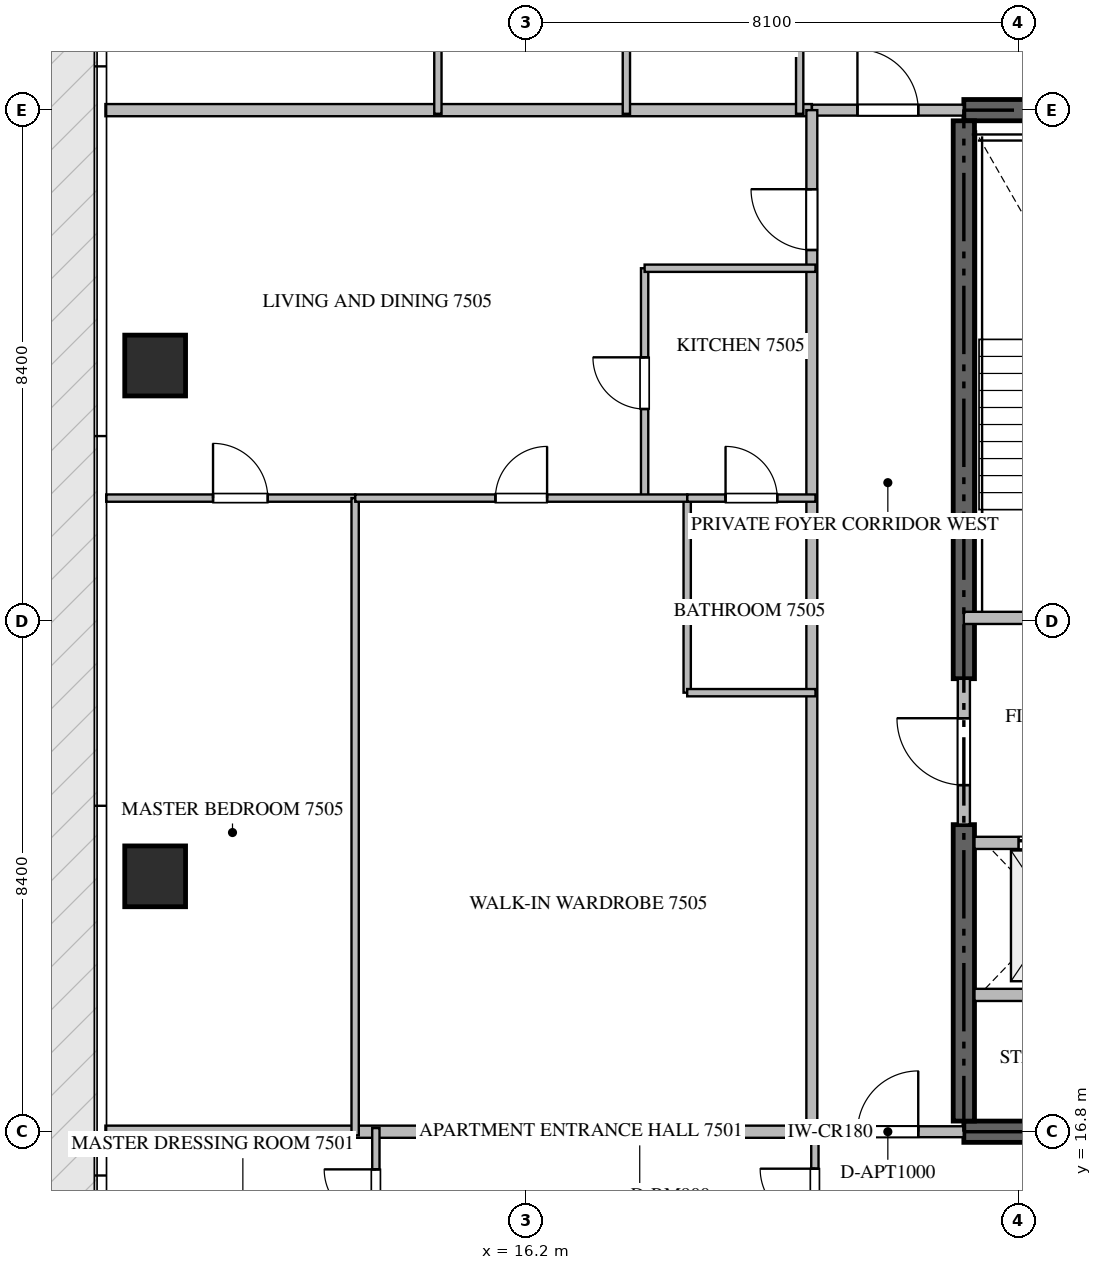
"""IFC4 building model, lengths in metres.
Left out: names, types, materials, properties, quantities, classifications, styles, units other than length and angle.
Written with IfcOpenShell. Run it as: python <this file> out.ifc"""

import sys

from ifc_helpers import new_model, si_unit, direction, frame, frame_2d, origin, origin_2d, place, context, subcontext, project, spatial, rectangle, extrude, source, transform, mapped, element, fill, save


model = new_model("IFC4")
c1 = context("Model", 3, precision=1e-05, world=origin(), true_north=direction((0.0, 1.0)))
c2 = subcontext(c1, "Body", "Model", "MODEL_VIEW")
j1 = project(units=[si_unit("LENGTHUNIT", "METRE"), si_unit("PLANEANGLEUNIT", "RADIAN")], contexts=[c1])
p1 = place(None, origin())
s1 = spatial("IfcSite", under=j1, at=p1, CompositionType="ELEMENT")
p2 = place(p1, origin())
s2 = spatial("IfcBuilding", under=s1, at=p2, CompositionType="ELEMENT")
p3 = place(p2, frame((0.0, 0.0, 301.55)))
s3 = spatial("IfcBuildingStorey", under=s2, at=p3, CompositionType="ELEMENT", Elevation=301.55)
for number, where, z_axis, x_axis in (
    (1, (23.4, 16.8, -0.26), (0.0, 0.0, 1.0), (1.0, 0.0, 0.0)),
    (2, (41.4, 33.6, -0.26), (0.0, 0.0, 1.0), (-1.0, 0.0, 0.0)),
):
    element("IfcWall", number, at=place(p3, frame(where, z_axis=z_axis, x_axis=x_axis)), inside=s3, PredefinedType="SHEAR", context=c2, shape_type="SweptSolid", body=[
        extrude(rectangle(XDim=18.0, YDim=0.35, at=frame_2d((9.0, 0.0))), origin(), (0.0, 0.0, 1.0), 4.048),
    ])
p4 = place(p3, frame((23.4, 16.975, -0.26), z_axis=(0.0, 0.0, 1.0), x_axis=(0.0, 1.0, 0.0)))
e3 = element("IfcWall", 3, at=p4, inside=s3, PredefinedType="SHEAR", context=c2, shape_type="SweptSolid", body=[
    extrude(rectangle(XDim=4.875, YDim=0.35, at=frame_2d((2.438, 0.0))), origin(), (0.0, 0.0, 1.0), 4.048),
])
p5 = place(p3, frame((23.4, 24.25, -0.26), z_axis=(0.0, 0.0, 1.0), x_axis=(0.0, 1.0, 0.0)))
e4 = element("IfcWall", 4, at=p5, inside=s3, PredefinedType="SHEAR", context=c2, shape_type="SweptSolid", body=[
    extrude(rectangle(XDim=9.175, YDim=0.35, at=frame_2d((4.587, 0.0))), origin(), (0.0, 0.0, 1.0), 4.048),
])
m1 = source(origin(), c2, "Body", "SweptSolid", [
    extrude(rectangle(XDim=1.0, YDim=1.0, at=origin_2d()), origin(), (0.0, 0.0, 1.0), 4.05),
])
for number, where, z_axis, x_axis in (
    (5, (10.1, 21.0, -0.26), (0.0, 0.0, 1.0), (1.0, 0.0, 0.0)),
    (6, (10.1, 29.4, -0.26), (0.0, 0.0, 1.0), (1.0, 0.0, 0.0)),
):
    element("IfcColumn", number, at=place(p3, frame(where, z_axis=z_axis, x_axis=x_axis)), inside=s3, PredefinedType="COLUMN", context=c2, shape_type="MappedRepresentation", body=[
        mapped(m1, transform((0.0, 0.0, 0.0), scale=1.0)),
    ])
p6 = place(p3, frame((23.4, 25.25, 0.0), z_axis=(0.0, 0.0, 1.0), x_axis=(1.0, 0.0, 0.0)))
e7 = element("IfcWall", 7, at=p6, inside=s3, PredefinedType="STANDARD", context=c2, shape_type="SweptSolid", body=[
    extrude(rectangle(XDim=4.45, YDim=0.2, at=frame_2d((2.225, 0.0))), origin(), (0.0, 0.0, 1.0), 3.79),
])
p7 = place(p6, frame((1.65, 0.0, 0.0)))
e8 = element("IfcOpeningElement", 8, at=p7, cuts=e7, PredefinedType="OPENING", context=c2, shape_type="SweptSolid", body=[
    extrude(rectangle(XDim=1.1, YDim=2.15, at=frame_2d((0.55, 1.075))), frame((0.0, 0.11, 0.0), z_axis=(0.0, -1.0, 0.0), x_axis=(1.0, 0.0, 0.0)), (0.0, 0.0, 1.0), 0.22),
])
p8 = place(p3, frame((23.575, 21.55, 0.0), z_axis=(0.0, 0.0, 1.0), x_axis=(1.0, 0.0, 0.0)))
e9 = element("IfcWall", 9, at=p8, inside=s3, PredefinedType="STANDARD", context=c2, shape_type="SweptSolid", body=[
    extrude(rectangle(XDim=2.475, YDim=0.2, at=frame_2d((1.238, 0.0))), origin(), (0.0, 0.0, 1.0), 3.79),
])
p9 = place(p8, frame((0.725, 0.0, 0.0)))
e10 = element("IfcOpeningElement", 10, at=p9, cuts=e9, PredefinedType="OPENING", context=c2, shape_type="SweptSolid", body=[
    extrude(rectangle(XDim=1.2, YDim=2.2, at=frame_2d((0.6, 1.1))), frame((0.0, 0.11, 0.0), z_axis=(0.0, -1.0, 0.0), x_axis=(1.0, 0.0, 0.0)), (0.0, 0.0, 1.0), 0.22),
])
p10 = place(p3, frame((23.575, 19.05, 0.0), z_axis=(0.0, 0.0, 1.0), x_axis=(1.0, 0.0, 0.0)))
e11 = element("IfcWall", 11, at=p10, inside=s3, PredefinedType="STANDARD", context=c2, shape_type="SweptSolid", body=[
    extrude(rectangle(XDim=2.475, YDim=0.2, at=frame_2d((1.238, 0.0))), origin(), (0.0, 0.0, 1.0), 3.79),
])
p11 = place(p3, frame((23.4, 21.852, 0.0), z_axis=(0.0, 0.0, 1.0), x_axis=(0.0, 1.0, 0.0)))
e12 = element("IfcWall", 12, at=p11, inside=s3, PredefinedType="STANDARD", context=c2, shape_type="SweptSolid", body=[
    extrude(rectangle(XDim=2.396, YDim=0.2, at=frame_2d((1.198, 0.0))), origin(), (0.0, 0.0, 1.0), 3.79),
])
p12 = place(p11, frame((0.648, 0.0, 0.0)))
e13 = element("IfcOpeningElement", 13, at=p12, cuts=e12, PredefinedType="OPENING", context=c2, shape_type="SweptSolid", body=[
    extrude(rectangle(XDim=1.1, YDim=2.15, at=frame_2d((0.55, 1.075))), frame((0.0, 0.11, 0.0), z_axis=(0.0, -1.0, 0.0), x_axis=(1.0, 0.0, 0.0)), (0.0, 0.0, 1.0), 0.22),
])
for number, where, z_axis, x_axis in (
    (14, (9.282, 16.8, 0.0), (0.0, 0.0, 1.0), (1.0, 0.0, 0.0)),
    (15, (9.282, 33.6, 0.0), (0.0, 0.0, 1.0), (1.0, 0.0, 0.0)),
):
    element("IfcWall", number, at=place(p3, frame(where, z_axis=z_axis, x_axis=x_axis)), inside=s3, PredefinedType="PARTITIONING", context=c2, shape_type="SweptSolid", body=[
        extrude(rectangle(XDim=11.618, YDim=0.2, at=frame_2d((5.809, 0.0))), origin(), (0.0, 0.0, 1.0), 3.79),
    ])
p13 = place(p3, frame((20.902, 16.8, 0.0), z_axis=(0.0, 0.0, 1.0), x_axis=(1.0, 0.0, 0.0)))
e16 = element("IfcWall", 16, at=p13, inside=s3, PredefinedType="PARTITIONING", context=c2, shape_type="SweptSolid", body=[
    extrude(rectangle(XDim=2.496, YDim=0.18, at=frame_2d((1.248, 0.0))), origin(), (0.0, 0.0, 1.0), 3.79),
])
p14 = place(p13, frame((0.748, 0.0, 0.0)))
e17 = element("IfcOpeningElement", 17, at=p14, cuts=e16, PredefinedType="OPENING", context=c2, shape_type="SweptSolid", body=[
    extrude(rectangle(XDim=1.0, YDim=2.15, at=frame_2d((0.5, 1.075))), frame((0.0, 0.1, 0.0), z_axis=(0.0, -1.0, 0.0), x_axis=(1.0, 0.0, 0.0)), (0.0, 0.0, 1.0), 0.2),
])
p15 = place(p3, frame((20.902, 33.6, 0.0), z_axis=(0.0, 0.0, 1.0), x_axis=(1.0, 0.0, 0.0)))
e18 = element("IfcWall", 18, at=p15, inside=s3, PredefinedType="PARTITIONING", context=c2, shape_type="SweptSolid", body=[
    extrude(rectangle(XDim=2.496, YDim=0.18, at=frame_2d((1.248, 0.0))), origin(), (0.0, 0.0, 1.0), 3.79),
])
p16 = place(p15, frame((0.748, 0.0, 0.0)))
e19 = element("IfcOpeningElement", 19, at=p16, cuts=e18, PredefinedType="OPENING", context=c2, shape_type="SweptSolid", body=[
    extrude(rectangle(XDim=1.0, YDim=2.15, at=frame_2d((0.5, 1.075))), frame((0.0, 0.1, 0.0), z_axis=(0.0, -1.0, 0.0), x_axis=(1.0, 0.0, 0.0)), (0.0, 0.0, 1.0), 0.2),
])
p17 = place(p3, frame((20.9, 16.8, 0.0), z_axis=(0.0, 0.0, 1.0), x_axis=(0.0, 1.0, 0.0)))
e20 = element("IfcWall", 20, at=p17, inside=s3, PredefinedType="PARTITIONING", context=c2, shape_type="SweptSolid", body=[
    extrude(rectangle(XDim=16.8, YDim=0.18, at=frame_2d((8.4, 0.0))), origin(), (0.0, 0.0, 1.0), 3.79),
])
p18 = place(p17, frame((14.5, 0.0, 0.0)))
e21 = element("IfcOpeningElement", 21, at=p18, cuts=e20, PredefinedType="OPENING", context=c2, shape_type="SweptSolid", body=[
    extrude(rectangle(XDim=1.0, YDim=2.15, at=frame_2d((0.5, 1.075))), frame((0.0, 0.1, 0.0), z_axis=(0.0, -1.0, 0.0), x_axis=(1.0, 0.0, 0.0)), (0.0, 0.0, 1.0), 0.2),
])
p19 = place(p3, frame((20.95, 14.65, 0.0), z_axis=(0.0, 0.0, 1.0), x_axis=(0.0, 1.0, 0.0)))
e22 = element("IfcWall", 22, at=p19, inside=s3, PredefinedType="PARTITIONING", context=c2, shape_type="SweptSolid", body=[
    extrude(rectangle(XDim=2.148, YDim=0.12, at=frame_2d((1.074, 0.0))), origin(), (0.0, 0.0, 1.0), 3.79),
])
p20 = place(p19, frame((0.642, 0.0, 0.0)))
e23 = element("IfcOpeningElement", 23, at=p20, cuts=e22, PredefinedType="OPENING", context=c2, shape_type="SweptSolid", body=[
    extrude(rectangle(XDim=0.9, YDim=2.1, at=frame_2d((0.45, 1.05))), frame((0.0, 0.07, 0.0), z_axis=(0.0, -1.0, 0.0), x_axis=(1.0, 0.0, 0.0)), (0.0, 0.0, 1.0), 0.14),
])
p21 = place(p3, frame((13.73, 14.652, 0.0), z_axis=(0.0, 0.0, 1.0), x_axis=(0.0, 1.0, 0.0)))
e24 = element("IfcWall", 24, at=p21, inside=s3, PredefinedType="PARTITIONING", context=c2, shape_type="SweptSolid", body=[
    extrude(rectangle(XDim=2.208, YDim=0.12, at=frame_2d((1.104, 0.0))), origin(), (0.0, 0.0, 1.0), 3.79),
])
p22 = place(p21, frame((0.679, 0.0, 0.0)))
e25 = element("IfcOpeningElement", 25, at=p22, cuts=e24, PredefinedType="OPENING", context=c2, shape_type="SweptSolid", body=[
    extrude(rectangle(XDim=0.85, YDim=2.1, at=frame_2d((0.425, 1.05))), frame((0.0, 0.07, 0.0), z_axis=(0.0, -1.0, 0.0), x_axis=(1.0, 0.0, 0.0)), (0.0, 0.0, 1.0), 0.14),
])
p23 = place(p3, frame((20.7, 36.35, 0.0), z_axis=(0.0, 0.0, 1.0), x_axis=(0.0, -1.0, 0.0)))
e26 = element("IfcWall", 26, at=p23, inside=s3, PredefinedType="PARTITIONING", context=c2, shape_type="SweptSolid", body=[
    extrude(rectangle(XDim=2.81, YDim=0.12, at=frame_2d((1.405, 0.0))), origin(), (0.0, 0.0, 1.0), 3.79),
])
p24 = place(p3, frame((14.75, 37.807, 0.0), z_axis=(0.0, 0.0, 1.0), x_axis=(0.0, -1.0, 0.0)))
e27 = element("IfcWall", 27, at=p24, inside=s3, PredefinedType="PARTITIONING", context=c2, shape_type="SweptSolid", body=[
    extrude(rectangle(XDim=4.267, YDim=0.12, at=frame_2d((2.133, 0.0))), origin(), (0.0, 0.0, 1.0), 3.79),
])
p25 = place(p3, frame((17.85, 37.805, 0.0), z_axis=(0.0, 0.0, 1.0), x_axis=(0.0, -1.0, 0.0)))
e28 = element("IfcWall", 28, at=p25, inside=s3, PredefinedType="PARTITIONING", context=c2, shape_type="SweptSolid", body=[
    extrude(rectangle(XDim=4.265, YDim=0.12, at=frame_2d((2.132, 0.0))), origin(), (0.0, 0.0, 1.0), 3.372),
])
p26 = place(p25, frame((1.848, 0.0, 0.0)))
e29 = element("IfcOpeningElement", 29, at=p26, cuts=e28, PredefinedType="OPENING", context=c2, shape_type="SweptSolid", body=[
    extrude(rectangle(XDim=0.85, YDim=2.1, at=frame_2d((0.425, 1.05))), frame((0.0, 0.07, 0.0), z_axis=(0.0, -1.0, 0.0), x_axis=(1.0, 0.0, 0.0)), (0.0, 0.0, 1.0), 0.14),
])
p27 = place(p3, frame((18.15, 27.22, 0.0), z_axis=(0.0, 0.0, 1.0), x_axis=(0.0, 1.0, 0.0)))
e30 = element("IfcWall", 30, at=p27, inside=s3, PredefinedType="PARTITIONING", context=c2, shape_type="SweptSolid", body=[
    extrude(rectangle(XDim=3.78, YDim=0.12, at=frame_2d((1.89, 0.0))), origin(), (0.0, 0.0, 1.0), 3.79),
])
p28 = place(p27, frame((1.465, 0.0, 0.0)))
e31 = element("IfcOpeningElement", 31, at=p28, cuts=e30, PredefinedType="OPENING", context=c2, shape_type="SweptSolid", body=[
    extrude(rectangle(XDim=0.85, YDim=2.1, at=frame_2d((0.425, 1.05))), frame((0.0, 0.07, 0.0), z_axis=(0.0, -1.0, 0.0), x_axis=(1.0, 0.0, 0.0)), (0.0, 0.0, 1.0), 0.14),
])
p29 = place(p3, frame((18.15, 31.0, 0.0), z_axis=(0.0, 0.0, 1.0), x_axis=(1.0, 0.0, 0.0)))
e32 = element("IfcWall", 32, at=p29, inside=s3, PredefinedType="PARTITIONING", context=c2, shape_type="SweptSolid", body=[
    extrude(rectangle(XDim=2.81, YDim=0.12, at=frame_2d((1.405, 0.0))), origin(), (0.0, 0.0, 1.0), 3.79),
])
p30 = place(p3, frame((9.295, 27.22, 0.0), z_axis=(0.0, 0.0, 1.0), x_axis=(1.0, 0.0, 0.0)))
e33 = element("IfcWall", 33, at=p30, inside=s3, PredefinedType="PARTITIONING", context=c2, shape_type="SweptSolid", body=[
    extrude(rectangle(XDim=4.094, YDim=0.12, at=frame_2d((2.047, 0.0))), origin(), (0.0, 0.0, 1.0), 3.79),
])
p31 = place(p30, frame((1.757, 0.0, 0.0)))
e34 = element("IfcOpeningElement", 34, at=p31, cuts=e33, PredefinedType="OPENING", context=c2, shape_type="SweptSolid", body=[
    extrude(rectangle(XDim=0.9, YDim=2.1, at=frame_2d((0.45, 1.05))), frame((0.0, 0.07, 0.0), z_axis=(0.0, -1.0, 0.0), x_axis=(1.0, 0.0, 0.0)), (0.0, 0.0, 1.0), 0.14),
])
p32 = place(p3, frame((13.389, 16.74, 0.0), z_axis=(0.0, 0.0, 1.0), x_axis=(0.0, 1.0, 0.0)))
e35 = element("IfcWall", 35, at=p32, inside=s3, PredefinedType="PARTITIONING", context=c2, shape_type="SweptSolid", body=[
    extrude(rectangle(XDim=10.48, YDim=0.12, at=frame_2d((5.24, 0.0))), origin(), (0.0, 0.0, 1.0), 3.79),
])
p33 = place(p3, frame((18.85, 24.02, 0.0), z_axis=(0.0, 0.0, 1.0), x_axis=(0.0, 1.0, 0.0)))
e36 = element("IfcWall", 36, at=p33, inside=s3, PredefinedType="PARTITIONING", context=c2, shape_type="SweptSolid", body=[
    extrude(rectangle(XDim=3.2, YDim=0.12, at=frame_2d((1.6, 0.0))), origin(), (0.0, 0.0, 1.0), 3.79),
])
p34 = place(p3, frame((18.85, 24.02, 0.0), z_axis=(0.0, 0.0, 1.0), x_axis=(1.0, 0.0, 0.0)))
e37 = element("IfcWall", 37, at=p34, inside=s3, PredefinedType="PARTITIONING", context=c2, shape_type="SweptSolid", body=[
    extrude(rectangle(XDim=2.11, YDim=0.12, at=frame_2d((1.055, 0.0))), origin(), (0.0, 0.0, 1.0), 3.79),
])
p35 = place(p3, frame((13.391, 27.22, 0.0), z_axis=(0.0, 0.0, 1.0), x_axis=(1.0, 0.0, 0.0)))
e38 = element("IfcWall", 38, at=p35, inside=s3, PredefinedType="PARTITIONING", context=c2, shape_type="SweptSolid", body=[
    extrude(rectangle(XDim=5.459, YDim=0.12, at=frame_2d((2.729, 0.0))), origin(), (0.0, 0.0, 1.0), 3.79),
])
p36 = place(p35, frame((2.305, 0.0, 0.0)))
e39 = element("IfcOpeningElement", 39, at=p36, cuts=e38, PredefinedType="OPENING", context=c2, shape_type="SweptSolid", body=[
    extrude(rectangle(XDim=0.85, YDim=2.1, at=frame_2d((0.425, 1.05))), frame((0.0, 0.07, 0.0), z_axis=(0.0, -1.0, 0.0), x_axis=(1.0, 0.0, 0.0)), (0.0, 0.0, 1.0), 0.14),
])
p37 = place(p3, frame((18.852, 27.22, 0.0), z_axis=(0.0, 0.0, 1.0), x_axis=(1.0, 0.0, 0.0)))
e40 = element("IfcWall", 40, at=p37, inside=s3, PredefinedType="PARTITIONING", context=c2, shape_type="SweptSolid", body=[
    extrude(rectangle(XDim=2.108, YDim=0.12, at=frame_2d((1.054, 0.0))), origin(), (0.0, 0.0, 1.0), 3.79),
])
p38 = place(p37, frame((0.629, 0.0, 0.0)))
e41 = element("IfcOpeningElement", 41, at=p38, cuts=e40, PredefinedType="OPENING", context=c2, shape_type="SweptSolid", body=[
    extrude(rectangle(XDim=0.85, YDim=2.1, at=frame_2d((0.425, 1.05))), frame((0.0, 0.07, 0.0), z_axis=(0.0, -1.0, 0.0), x_axis=(1.0, 0.0, 0.0)), (0.0, 0.0, 1.0), 0.14),
])
m2 = source(origin(), c2, "Body", "SweptSolid", [
    extrude(rectangle(XDim=1.2, YDim=2.2, at=frame_2d((0.6, 1.1))), frame((0.0, 0.025, 0.0), z_axis=(0.0, -1.0, 0.0), x_axis=(1.0, 0.0, 0.0)), (0.0, 0.0, 1.0), 0.05),
])
p39 = place(p9, origin())
e42 = element("IfcDoor", 42, at=p39, inside=s3, OperationType="DOUBLE_DOOR_SLIDING", PredefinedType="DOOR", context=c2, shape_type="MappedRepresentation", body=[
    mapped(m2, transform((0.0, 0.0, 0.0), scale=1.0)),
])
fill(e10, e42)
m3 = source(origin(), c2, "Body", "SweptSolid", [
    extrude(rectangle(XDim=1.1, YDim=2.15, at=frame_2d((0.55, 1.075))), frame((0.0, 0.025, 0.0), z_axis=(0.0, -1.0, 0.0), x_axis=(1.0, 0.0, 0.0)), (0.0, 0.0, 1.0), 0.05),
])
p40 = place(p12, origin())
e43 = element("IfcDoor", 43, at=p40, inside=s3, OperationType="SINGLE_SWING_RIGHT", PredefinedType="DOOR", context=c2, shape_type="MappedRepresentation", body=[
    mapped(m3, transform((0.0, 0.0, 0.0), scale=1.0)),
])
fill(e13, e43)
m4 = source(origin(), c2, "Body", "SweptSolid", [
    extrude(rectangle(XDim=1.0, YDim=2.15, at=frame_2d((0.5, 1.075))), frame((0.0, 0.025, 0.0), z_axis=(0.0, -1.0, 0.0), x_axis=(1.0, 0.0, 0.0)), (0.0, 0.0, 1.0), 0.05),
])
p41 = place(p14, origin())
e44 = element("IfcDoor", 44, at=p41, inside=s3, OperationType="SINGLE_SWING_RIGHT", PredefinedType="DOOR", context=c2, shape_type="MappedRepresentation", body=[
    mapped(m4, transform((0.0, 0.0, 0.0), scale=1.0)),
])
fill(e17, e44)
p42 = place(p16, origin())
e45 = element("IfcDoor", 45, at=p42, inside=s3, OperationType="SINGLE_SWING_LEFT", PredefinedType="DOOR", context=c2, shape_type="MappedRepresentation", body=[
    mapped(m4, transform((0.0, 0.0, 0.0), scale=1.0)),
])
fill(e19, e45)
p43 = place(p18, origin())
e46 = element("IfcDoor", 46, at=p43, inside=s3, OperationType="SINGLE_SWING_RIGHT", PredefinedType="DOOR", context=c2, shape_type="MappedRepresentation", body=[
    mapped(m4, transform((0.0, 0.0, 0.0), scale=1.0)),
])
fill(e21, e46)
m5 = source(origin(), c2, "Body", "SweptSolid", [
    extrude(rectangle(XDim=0.9, YDim=2.1, at=frame_2d((0.45, 1.05))), frame((0.0, 0.025, 0.0), z_axis=(0.0, -1.0, 0.0), x_axis=(1.0, 0.0, 0.0)), (0.0, 0.0, 1.0), 0.05),
])
p44 = place(p20, origin())
e47 = element("IfcDoor", 47, at=p44, inside=s3, OperationType="SINGLE_SWING_RIGHT", PredefinedType="DOOR", context=c2, shape_type="MappedRepresentation", body=[
    mapped(m5, transform((0.0, 0.0, 0.0), scale=1.0)),
])
fill(e23, e47)
m6 = source(origin(), c2, "Body", "SweptSolid", [
    extrude(rectangle(XDim=0.85, YDim=2.1, at=frame_2d((0.425, 1.05))), frame((0.0, 0.025, 0.0), z_axis=(0.0, -1.0, 0.0), x_axis=(1.0, 0.0, 0.0)), (0.0, 0.0, 1.0), 0.05),
])
p45 = place(p22, origin())
e48 = element("IfcDoor", 48, at=p45, inside=s3, OperationType="SINGLE_SWING_RIGHT", PredefinedType="DOOR", context=c2, shape_type="MappedRepresentation", body=[
    mapped(m6, transform((0.0, 0.0, 0.0), scale=1.0)),
])
fill(e25, e48)
p46 = place(p28, origin())
e49 = element("IfcDoor", 49, at=p46, inside=s3, OperationType="SINGLE_SWING_RIGHT", PredefinedType="DOOR", context=c2, shape_type="MappedRepresentation", body=[
    mapped(m6, transform((0.0, 0.0, 0.0), scale=1.0)),
])
fill(e31, e49)
p47 = place(p31, origin())
e50 = element("IfcDoor", 50, at=p47, inside=s3, OperationType="SINGLE_SWING_LEFT", PredefinedType="DOOR", context=c2, shape_type="MappedRepresentation", body=[
    mapped(m5, transform((0.0, 0.0, 0.0), scale=1.0)),
])
fill(e34, e50)
p48 = place(p36, origin())
e51 = element("IfcDoor", 51, at=p48, inside=s3, OperationType="SINGLE_SWING_RIGHT", PredefinedType="DOOR", context=c2, shape_type="MappedRepresentation", body=[
    mapped(m6, transform((0.0, 0.0, 0.0), scale=1.0)),
])
fill(e39, e51)
p49 = place(p38, origin())
e52 = element("IfcDoor", 52, at=p49, inside=s3, OperationType="SINGLE_SWING_LEFT", PredefinedType="DOOR", context=c2, shape_type="MappedRepresentation", body=[
    mapped(m6, transform((0.0, 0.0, 0.0), scale=1.0)),
])
fill(e41, e52)
save(model, sys.argv[1])
